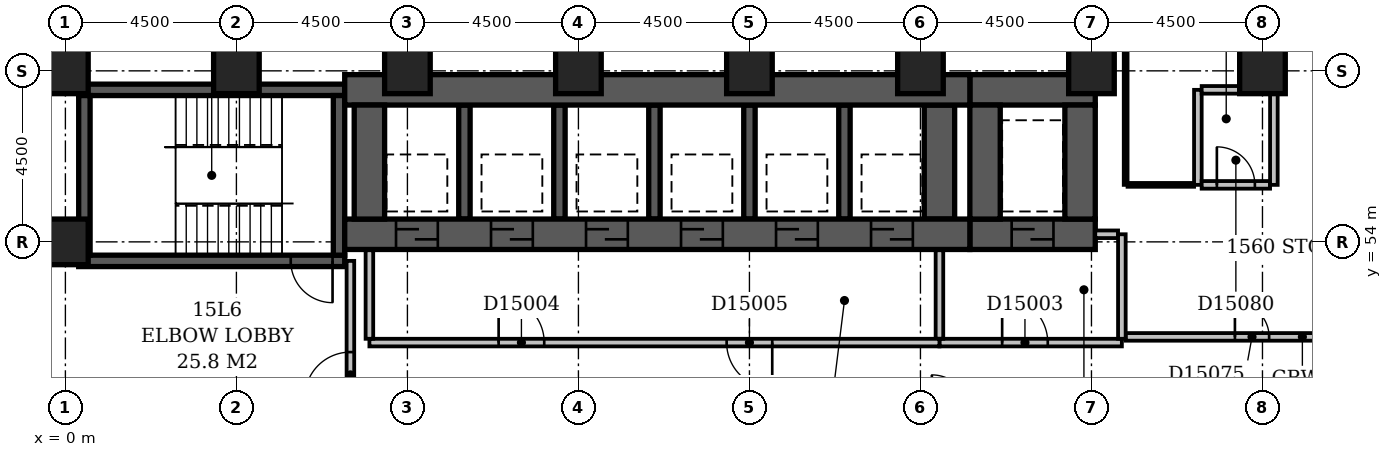
"""IFC4 building model, lengths in metres.
Left out: names, types, materials, properties, quantities, classifications, styles, units other than length and angle.
Written with IfcOpenShell. Run it as: python <this file> out.ifc"""

import sys

from ifc_helpers import new_model, si_unit, direction, frame, frame_2d, origin, origin_2d, place, context, subcontext, project, spatial, rectangle, extrude, element, fill, save


model = new_model("IFC4")
c1 = context("Model", 3, precision=1e-05, world=origin(), true_north=direction((0.0, 1.0)))
c2 = subcontext(c1, "Body", "Model", "MODEL_VIEW")
j1 = project(units=[si_unit("LENGTHUNIT", "METRE"), si_unit("PLANEANGLEUNIT", "RADIAN")], contexts=[c1])
p1 = place(None, origin())
s1 = spatial("IfcSite", under=j1, at=p1, CompositionType="ELEMENT")
p2 = place(p1, origin())
s2 = spatial("IfcBuilding", under=s1, at=p2, CompositionType="ELEMENT")
p3 = place(p2, frame((0.0, 0.0, 65.0)))
s3 = spatial("IfcBuildingStorey", under=s2, at=p3, CompositionType="ELEMENT", Elevation=65.0)
p4 = place(p3, frame((0.35, 53.5, -0.3), z_axis=(0.0, 0.0, 1.0), x_axis=(1.0, 0.0, 0.0)))
e1 = element("IfcWall", 1, at=p4, inside=s3, PredefinedType="SHEAR", context=c2, shape_type="SweptSolid", body=[
    extrude(rectangle(XDim=7.0, YDim=0.3, at=frame_2d((3.5, 0.0))), origin(), (0.0, 0.0, 1.0), 3.6),
])
p5 = place(p4, frame((5.58, 0.0, 0.3)))
e2 = element("IfcOpeningElement", 2, at=p5, cuts=e1, PredefinedType="OPENING", context=c2, shape_type="SweptSolid", body=[
    extrude(rectangle(XDim=1.1, YDim=2.1, at=frame_2d((0.55, 1.05))), frame((0.0, 0.162, 0.0), z_axis=(0.0, -1.0, 0.0), x_axis=(1.0, 0.0, 0.0)), (0.0, 0.0, 1.0), 0.324),
])
p6 = place(p3, frame((0.35, 58.0, -0.3), z_axis=(0.0, 0.0, 1.0), x_axis=(1.0, 0.0, 0.0)))
e3 = element("IfcWall", 3, at=p6, inside=s3, PredefinedType="SHEAR", context=c2, shape_type="SweptSolid", body=[
    extrude(rectangle(XDim=7.0, YDim=0.3, at=frame_2d((3.5, 0.0))), origin(), (0.0, 0.0, 1.0), 3.6),
])
for number, where, z_axis, x_axis in (
    (4, (0.5, 53.65, -0.3), (0.0, 0.0, 1.0), (0.0, 1.0, 0.0)),
    (5, (7.2, 53.65, -0.3), (0.0, 0.0, 1.0), (0.0, 1.0, 0.0)),
):
    element("IfcWall", number, at=place(p3, frame(where, z_axis=z_axis, x_axis=x_axis)), inside=s3, PredefinedType="SHEAR", context=c2, shape_type="SweptSolid", body=[
        extrude(rectangle(XDim=4.2, YDim=0.3, at=frame_2d((2.1, 0.0))), origin(), (0.0, 0.0, 1.0), 3.6),
    ])
p7 = place(p3, frame((7.35, 54.2, -0.3), z_axis=(0.0, 0.0, 1.0), x_axis=(1.0, 0.0, 0.0)))
e6 = element("IfcWall", 6, at=p7, inside=s3, PredefinedType="SHEAR", context=c2, shape_type="SweptSolid", body=[
    extrude(rectangle(XDim=16.45, YDim=0.8, at=frame_2d((8.225, 0.0))), origin(), (0.0, 0.0, 1.0), 3.6),
])
p8 = place(p7, frame((1.35, 0.0, 0.3)))
e7 = element("IfcOpeningElement", 7, at=p8, cuts=e6, PredefinedType="OPENING", context=c2, shape_type="SweptSolid", body=[
    extrude(rectangle(XDim=1.1, YDim=2.1, at=frame_2d((0.55, 1.05))), frame((0.0, 0.412, 0.0), z_axis=(0.0, -1.0, 0.0), x_axis=(1.0, 0.0, 0.0)), (0.0, 0.0, 1.0), 0.824),
])
p9 = place(p7, frame((3.85, 0.0, 0.3)))
e8 = element("IfcOpeningElement", 8, at=p9, cuts=e6, PredefinedType="OPENING", context=c2, shape_type="SweptSolid", body=[
    extrude(rectangle(XDim=1.1, YDim=2.1, at=frame_2d((0.55, 1.05))), frame((0.0, 0.412, 0.0), z_axis=(0.0, -1.0, 0.0), x_axis=(1.0, 0.0, 0.0)), (0.0, 0.0, 1.0), 0.824),
])
p10 = place(p7, frame((6.35, 0.0, 0.3)))
e9 = element("IfcOpeningElement", 9, at=p10, cuts=e6, PredefinedType="OPENING", context=c2, shape_type="SweptSolid", body=[
    extrude(rectangle(XDim=1.1, YDim=2.1, at=frame_2d((0.55, 1.05))), frame((0.0, 0.412, 0.0), z_axis=(0.0, -1.0, 0.0), x_axis=(1.0, 0.0, 0.0)), (0.0, 0.0, 1.0), 0.824),
])
p11 = place(p7, frame((8.85, 0.0, 0.3)))
e10 = element("IfcOpeningElement", 10, at=p11, cuts=e6, PredefinedType="OPENING", context=c2, shape_type="SweptSolid", body=[
    extrude(rectangle(XDim=1.1, YDim=2.1, at=frame_2d((0.55, 1.05))), frame((0.0, 0.412, 0.0), z_axis=(0.0, -1.0, 0.0), x_axis=(1.0, 0.0, 0.0)), (0.0, 0.0, 1.0), 0.824),
])
p12 = place(p7, frame((11.35, 0.0, 0.3)))
e11 = element("IfcOpeningElement", 11, at=p12, cuts=e6, PredefinedType="OPENING", context=c2, shape_type="SweptSolid", body=[
    extrude(rectangle(XDim=1.1, YDim=2.1, at=frame_2d((0.55, 1.05))), frame((0.0, 0.412, 0.0), z_axis=(0.0, -1.0, 0.0), x_axis=(1.0, 0.0, 0.0)), (0.0, 0.0, 1.0), 0.824),
])
p13 = place(p7, frame((13.85, 0.0, 0.3)))
e12 = element("IfcOpeningElement", 12, at=p13, cuts=e6, PredefinedType="OPENING", context=c2, shape_type="SweptSolid", body=[
    extrude(rectangle(XDim=1.1, YDim=2.1, at=frame_2d((0.55, 1.05))), frame((0.0, 0.412, 0.0), z_axis=(0.0, -1.0, 0.0), x_axis=(1.0, 0.0, 0.0)), (0.0, 0.0, 1.0), 0.824),
])
p14 = place(p3, frame((7.35, 58.0, -0.3), z_axis=(0.0, 0.0, 1.0), x_axis=(1.0, 0.0, 0.0)))
e13 = element("IfcWall", 13, at=p14, inside=s3, PredefinedType="SHEAR", context=c2, shape_type="SweptSolid", body=[
    extrude(rectangle(XDim=16.45, YDim=0.8, at=frame_2d((8.225, 0.0))), origin(), (0.0, 0.0, 1.0), 3.6),
])
p15 = place(p3, frame((8.0, 54.6, -0.3), z_axis=(0.0, 0.0, 1.0), x_axis=(0.0, 1.0, 0.0)))
e14 = element("IfcWall", 14, at=p15, inside=s3, PredefinedType="SHEAR", context=c2, shape_type="SweptSolid", body=[
    extrude(rectangle(XDim=3.0, YDim=0.8, at=frame_2d((1.5, 0.0))), origin(), (0.0, 0.0, 1.0), 3.6),
])
for number, where, z_axis, x_axis in (
    (15, (10.5, 54.6, -0.3), (0.0, 0.0, 1.0), (0.0, 1.0, 0.0)),
    (16, (13.0, 54.6, -0.3), (0.0, 0.0, 1.0), (0.0, 1.0, 0.0)),
    (17, (15.5, 54.6, -0.3), (0.0, 0.0, 1.0), (0.0, 1.0, 0.0)),
    (18, (18.0, 54.6, -0.3), (0.0, 0.0, 1.0), (0.0, 1.0, 0.0)),
    (19, (20.5, 54.6, -0.3), (0.0, 0.0, 1.0), (0.0, 1.0, 0.0)),
):
    element("IfcWall", number, at=place(p3, frame(where, z_axis=z_axis, x_axis=x_axis)), inside=s3, PredefinedType="SHEAR", context=c2, shape_type="SweptSolid", body=[
        extrude(rectangle(XDim=3.0, YDim=0.3, at=frame_2d((1.5, 0.0))), origin(), (0.0, 0.0, 1.0), 3.6),
    ])
p16 = place(p3, frame((23.0, 54.6, -0.3), z_axis=(0.0, 0.0, 1.0), x_axis=(0.0, 1.0, 0.0)))
e20 = element("IfcWall", 20, at=p16, inside=s3, PredefinedType="SHEAR", context=c2, shape_type="SweptSolid", body=[
    extrude(rectangle(XDim=3.0, YDim=0.8, at=frame_2d((1.5, 0.0))), origin(), (0.0, 0.0, 1.0), 3.6),
])
p17 = place(p3, frame((23.8, 54.2, -0.3), z_axis=(0.0, 0.0, 1.0), x_axis=(1.0, 0.0, 0.0)))
e21 = element("IfcWall", 21, at=p17, inside=s3, PredefinedType="SHEAR", context=c2, shape_type="SweptSolid", body=[
    extrude(rectangle(XDim=3.3, YDim=0.8, at=frame_2d((1.65, 0.0))), origin(), (0.0, 0.0, 1.0), 3.6),
])
p18 = place(p17, frame((1.1, 0.0, 0.3)))
e22 = element("IfcOpeningElement", 22, at=p18, cuts=e21, PredefinedType="OPENING", context=c2, shape_type="SweptSolid", body=[
    extrude(rectangle(XDim=1.1, YDim=2.1, at=frame_2d((0.55, 1.05))), frame((0.0, 0.412, 0.0), z_axis=(0.0, -1.0, 0.0), x_axis=(1.0, 0.0, 0.0)), (0.0, 0.0, 1.0), 0.824),
])
p19 = place(p3, frame((23.8, 58.0, -0.3), z_axis=(0.0, 0.0, 1.0), x_axis=(1.0, 0.0, 0.0)))
e23 = element("IfcWall", 23, at=p19, inside=s3, PredefinedType="SHEAR", context=c2, shape_type="SweptSolid", body=[
    extrude(rectangle(XDim=3.3, YDim=0.8, at=frame_2d((1.65, 0.0))), origin(), (0.0, 0.0, 1.0), 3.6),
])
for number, where, z_axis, x_axis in (
    (24, (24.2, 54.6, -0.3), (0.0, 0.0, 1.0), (0.0, 1.0, 0.0)),
    (25, (26.7, 54.6, -0.3), (0.0, 0.0, 1.0), (0.0, 1.0, 0.0)),
):
    element("IfcWall", number, at=place(p3, frame(where, z_axis=z_axis, x_axis=x_axis)), inside=s3, PredefinedType="SHEAR", context=c2, shape_type="SweptSolid", body=[
        extrude(rectangle(XDim=3.0, YDim=0.8, at=frame_2d((1.5, 0.0))), origin(), (0.0, 0.0, 1.0), 3.6),
    ])
for number, where, z_axis, x_axis in (
    (26, (0.0, 54.0, -0.3), (0.0, 0.0, 1.0), (1.0, 0.0, 0.0)),
    (27, (0.0, 58.5, -0.3), (0.0, 0.0, 1.0), (1.0, 0.0, 0.0)),
    (28, (4.5, 58.5, -0.3), (0.0, 0.0, 1.0), (1.0, 0.0, 0.0)),
    (29, (9.0, 58.5, -0.3), (0.0, 0.0, 1.0), (1.0, 0.0, 0.0)),
    (30, (13.5, 58.5, -0.3), (0.0, 0.0, 1.0), (1.0, 0.0, 0.0)),
    (31, (18.0, 58.5, -0.3), (0.0, 0.0, 1.0), (1.0, 0.0, 0.0)),
    (32, (22.5, 58.5, -0.3), (0.0, 0.0, 1.0), (1.0, 0.0, 0.0)),
    (33, (27.0, 58.5, -0.3), (0.0, 0.0, 1.0), (1.0, 0.0, 0.0)),
    (34, (31.5, 58.5, -0.3), (0.0, 0.0, 1.0), (1.0, 0.0, 0.0)),
):
    element("IfcColumn", number, at=place(p3, frame(where, z_axis=z_axis, x_axis=x_axis)), inside=s3, PredefinedType="COLUMN", context=c2, shape_type="SweptSolid", body=[
        extrude(rectangle(XDim=1.2, YDim=1.2, at=origin_2d()), origin(), (0.0, 0.0, 1.0), 3.6),
    ])
p20 = place(p3, frame((8.0, 51.35, 0.0), z_axis=(0.0, 0.0, 1.0), x_axis=(1.0, 0.0, 0.0)))
e35 = element("IfcWall", 35, at=p20, inside=s3, PredefinedType="PARTITIONING", context=c2, shape_type="SweptSolid", body=[
    extrude(rectangle(XDim=15.0, YDim=0.2, at=frame_2d((7.5, 0.0))), origin(), (0.0, 0.0, 1.0), 3.3),
])
p21 = place(p20, frame((3.4, 0.0, 0.0)))
e36 = element("IfcOpeningElement", 36, at=p21, cuts=e35, PredefinedType="OPENING", context=c2, shape_type="SweptSolid", body=[
    extrude(rectangle(XDim=1.2, YDim=2.1, at=frame_2d((0.6, 1.05))), frame((0.0, 0.112, 0.0), z_axis=(0.0, -1.0, 0.0), x_axis=(1.0, 0.0, 0.0)), (0.0, 0.0, 1.0), 0.224),
])
p22 = place(p20, frame((9.4, 0.0, 0.0)))
e37 = element("IfcOpeningElement", 37, at=p22, cuts=e35, PredefinedType="OPENING", context=c2, shape_type="SweptSolid", body=[
    extrude(rectangle(XDim=1.2, YDim=2.1, at=frame_2d((0.6, 1.05))), frame((0.0, 0.112, 0.0), z_axis=(0.0, -1.0, 0.0), x_axis=(1.0, 0.0, 0.0)), (0.0, 0.0, 1.0), 0.224),
])
for number, where, z_axis, x_axis in (
    (38, (23.0, 51.45, 0.0), (0.0, 0.0, 1.0), (0.0, 1.0, 0.0)),
    (39, (8.0, 51.45, 0.0), (0.0, 0.0, 1.0), (0.0, 1.0, 0.0)),
):
    element("IfcWall", number, at=place(p3, frame(where, z_axis=z_axis, x_axis=x_axis)), inside=s3, PredefinedType="PARTITIONING", context=c2, shape_type="SweptSolid", body=[
        extrude(rectangle(XDim=2.33, YDim=0.2, at=frame_2d((1.165, 0.0))), origin(), (0.0, 0.0, 1.0), 3.3),
    ])
p23 = place(p3, frame((23.0, 51.35, 0.0), z_axis=(0.0, 0.0, 1.0), x_axis=(1.0, 0.0, 0.0)))
e40 = element("IfcWall", 40, at=p23, inside=s3, PredefinedType="PARTITIONING", context=c2, shape_type="SweptSolid", body=[
    extrude(rectangle(XDim=4.8, YDim=0.2, at=frame_2d((2.4, 0.0))), origin(), (0.0, 0.0, 1.0), 3.3),
])
p24 = place(p23, frame((1.65, 0.0, 0.0)))
e41 = element("IfcOpeningElement", 41, at=p24, cuts=e40, PredefinedType="OPENING", context=c2, shape_type="SweptSolid", body=[
    extrude(rectangle(XDim=1.2, YDim=2.1, at=frame_2d((0.6, 1.05))), frame((0.0, 0.112, 0.0), z_axis=(0.0, -1.0, 0.0), x_axis=(1.0, 0.0, 0.0)), (0.0, 0.0, 1.0), 0.224),
])
p25 = place(p3, frame((27.8, 51.45, 0.0), z_axis=(0.0, 0.0, 1.0), x_axis=(0.0, 1.0, 0.0)))
e42 = element("IfcWall", 42, at=p25, inside=s3, PredefinedType="PARTITIONING", context=c2, shape_type="SweptSolid", body=[
    extrude(rectangle(XDim=2.75, YDim=0.2, at=frame_2d((1.375, 0.0))), origin(), (0.0, 0.0, 1.0), 3.3),
])
p26 = place(p3, frame((27.1, 54.2, 0.0), z_axis=(0.0, 0.0, 1.0), x_axis=(1.0, 0.0, 0.0)))
e43 = element("IfcWall", 43, at=p26, inside=s3, PredefinedType="PARTITIONING", context=c2, shape_type="SweptSolid", body=[
    extrude(rectangle(XDim=0.6, YDim=0.2, at=frame_2d((0.3, 0.0))), origin(), (0.0, 0.0, 1.0), 3.3),
])
p27 = place(p3, frame((7.5, 49.6, 0.0), z_axis=(0.0, 0.0, 1.0), x_axis=(0.0, 1.0, 0.0)))
e44 = element("IfcWall", 44, at=p27, inside=s3, PredefinedType="PARTITIONING", context=c2, shape_type="SweptSolid", body=[
    extrude(rectangle(XDim=3.9, YDim=0.2, at=frame_2d((1.95, 0.0))), origin(), (0.0, 0.0, 1.0), 3.3),
])
p28 = place(p27, frame((0.3, 0.0, 0.0)))
e45 = element("IfcOpeningElement", 45, at=p28, cuts=e44, PredefinedType="OPENING", context=c2, shape_type="SweptSolid", body=[
    extrude(rectangle(XDim=1.2, YDim=2.1, at=frame_2d((0.6, 1.05))), frame((0.0, 0.112, 0.0), z_axis=(0.0, -1.0, 0.0), x_axis=(1.0, 0.0, 0.0)), (0.0, 0.0, 1.0), 0.224),
])
p29 = place(p3, frame((27.9, 51.5, 0.0), z_axis=(0.0, 0.0, 1.0), x_axis=(1.0, 0.0, 0.0)))
e46 = element("IfcWall", 46, at=p29, inside=s3, PredefinedType="PARTITIONING", context=c2, shape_type="SweptSolid", body=[
    extrude(rectangle(XDim=9.3, YDim=0.2, at=frame_2d((4.65, 0.0))), origin(), (0.0, 0.0, 1.0), 3.3),
])
p30 = place(p29, frame((2.875, 0.0, 0.0)))
e47 = element("IfcOpeningElement", 47, at=p30, cuts=e46, PredefinedType="OPENING", context=c2, shape_type="SweptSolid", body=[
    extrude(rectangle(XDim=0.9, YDim=2.1, at=frame_2d((0.45, 1.05))), frame((0.0, 0.112, 0.0), z_axis=(0.0, -1.0, 0.0), x_axis=(1.0, 0.0, 0.0)), (0.0, 0.0, 1.0), 0.224),
])
p31 = place(p29, frame((7.575, 0.0, 0.0)))
e48 = element("IfcOpeningElement", 48, at=p31, cuts=e46, PredefinedType="OPENING", context=c2, shape_type="SweptSolid", body=[
    extrude(rectangle(XDim=1.0, YDim=2.1, at=frame_2d((0.5, 1.05))), frame((0.0, 0.112, 0.0), z_axis=(0.0, -1.0, 0.0), x_axis=(1.0, 0.0, 0.0)), (0.0, 0.0, 1.0), 0.224),
])
p32 = place(p3, frame((27.9, 55.5, 0.0), z_axis=(0.0, 0.0, 1.0), x_axis=(0.0, 1.0, 0.0)))
e49 = element("IfcWall", 49, at=p32, inside=s3, PredefinedType="PARTITIONING", context=c2, shape_type="SweptSolid", body=[
    extrude(rectangle(XDim=3.6, YDim=0.1, at=frame_2d((1.8, 0.0))), origin(), (0.0, 0.0, 1.0), 3.3),
])
p33 = place(p3, frame((27.95, 55.5, 0.0), z_axis=(0.0, 0.0, 1.0), x_axis=(1.0, 0.0, 0.0)))
e50 = element("IfcWall", 50, at=p33, inside=s3, PredefinedType="PARTITIONING", context=c2, shape_type="SweptSolid", body=[
    extrude(rectangle(XDim=1.75, YDim=0.1, at=frame_2d((0.875, 0.0))), origin(), (0.0, 0.0, 1.0), 3.3),
])
p34 = place(p3, frame((29.8, 55.5, 0.0), z_axis=(0.0, 0.0, 1.0), x_axis=(0.0, 1.0, 0.0)))
e51 = element("IfcWall", 51, at=p34, inside=s3, PredefinedType="PARTITIONING", context=c2, shape_type="SweptSolid", body=[
    extrude(rectangle(XDim=2.5, YDim=0.2, at=frame_2d((1.25, 0.0))), origin(), (0.0, 0.0, 1.0), 3.3),
])
p35 = place(p3, frame((29.9, 55.5, 0.0), z_axis=(0.0, 0.0, 1.0), x_axis=(1.0, 0.0, 0.0)))
e52 = element("IfcWall", 52, at=p35, inside=s3, PredefinedType="PARTITIONING", context=c2, shape_type="SweptSolid", body=[
    extrude(rectangle(XDim=1.8, YDim=0.2, at=frame_2d((0.9, 0.0))), origin(), (0.0, 0.0, 1.0), 3.3),
])
p36 = place(p35, frame((0.4, 0.0, 0.0)))
e53 = element("IfcOpeningElement", 53, at=p36, cuts=e52, PredefinedType="OPENING", context=c2, shape_type="SweptSolid", body=[
    extrude(rectangle(XDim=1.0, YDim=2.1, at=frame_2d((0.5, 1.05))), frame((0.0, 0.112, 0.0), z_axis=(0.0, -1.0, 0.0), x_axis=(1.0, 0.0, 0.0)), (0.0, 0.0, 1.0), 0.224),
])
p37 = place(p3, frame((31.8, 55.5, 0.0), z_axis=(0.0, 0.0, 1.0), x_axis=(0.0, 1.0, 0.0)))
e54 = element("IfcWall", 54, at=p37, inside=s3, PredefinedType="PARTITIONING", context=c2, shape_type="SweptSolid", body=[
    extrude(rectangle(XDim=2.5, YDim=0.2, at=frame_2d((1.25, 0.0))), origin(), (0.0, 0.0, 1.0), 3.3),
])
p38 = place(p3, frame((29.9, 58.0, 0.0), z_axis=(0.0, 0.0, 1.0), x_axis=(1.0, 0.0, 0.0)))
e55 = element("IfcWall", 55, at=p38, inside=s3, PredefinedType="PARTITIONING", context=c2, shape_type="SweptSolid", body=[
    extrude(rectangle(XDim=1.8, YDim=0.2, at=frame_2d((0.9, 0.0))), origin(), (0.0, 0.0, 1.0), 3.3),
])
p39 = place(p28, origin())
e56 = element("IfcDoor", 56, at=p39, inside=s3, OperationType="SINGLE_SWING_LEFT", PredefinedType="DOOR", context=c2, shape_type="SweptSolid", body=[
    extrude(rectangle(XDim=1.2, YDim=2.1, at=frame_2d((0.6, 1.05))), frame((0.0, 0.025, 0.0), z_axis=(0.0, -1.0, 0.0), x_axis=(1.0, 0.0, 0.0)), (0.0, 0.0, 1.0), 0.05),
])
fill(e45, e56)
p40 = place(p24, origin())
e57 = element("IfcDoor", 57, at=p40, inside=s3, OperationType="SINGLE_SWING_LEFT", PredefinedType="DOOR", context=c2, shape_type="SweptSolid", body=[
    extrude(rectangle(XDim=1.2, YDim=2.1, at=frame_2d((0.6, 1.05))), frame((0.0, 0.025, 0.0), z_axis=(0.0, -1.0, 0.0), x_axis=(1.0, 0.0, 0.0)), (0.0, 0.0, 1.0), 0.05),
])
fill(e41, e57)
p41 = place(p18, origin())
e58 = element("IfcDoor", 58, at=p41, inside=s3, OperationType="SLIDING_TO_LEFT", PredefinedType="DOOR", context=c2, shape_type="SweptSolid", body=[
    extrude(rectangle(XDim=1.1, YDim=2.1, at=frame_2d((0.55, 1.05))), frame((0.0, 0.025, 0.0), z_axis=(0.0, -1.0, 0.0), x_axis=(1.0, 0.0, 0.0)), (0.0, 0.0, 1.0), 0.05),
])
fill(e22, e58)
p42 = place(p8, origin())
e59 = element("IfcDoor", 59, at=p42, inside=s3, OperationType="SLIDING_TO_LEFT", PredefinedType="DOOR", context=c2, shape_type="SweptSolid", body=[
    extrude(rectangle(XDim=1.1, YDim=2.1, at=frame_2d((0.55, 1.05))), frame((0.0, 0.025, 0.0), z_axis=(0.0, -1.0, 0.0), x_axis=(1.0, 0.0, 0.0)), (0.0, 0.0, 1.0), 0.05),
])
fill(e7, e59)
p43 = place(p9, origin())
e60 = element("IfcDoor", 60, at=p43, inside=s3, OperationType="SLIDING_TO_LEFT", PredefinedType="DOOR", context=c2, shape_type="SweptSolid", body=[
    extrude(rectangle(XDim=1.1, YDim=2.1, at=frame_2d((0.55, 1.05))), frame((0.0, 0.025, 0.0), z_axis=(0.0, -1.0, 0.0), x_axis=(1.0, 0.0, 0.0)), (0.0, 0.0, 1.0), 0.05),
])
fill(e8, e60)
p44 = place(p10, origin())
e61 = element("IfcDoor", 61, at=p44, inside=s3, OperationType="SLIDING_TO_LEFT", PredefinedType="DOOR", context=c2, shape_type="SweptSolid", body=[
    extrude(rectangle(XDim=1.1, YDim=2.1, at=frame_2d((0.55, 1.05))), frame((0.0, 0.025, 0.0), z_axis=(0.0, -1.0, 0.0), x_axis=(1.0, 0.0, 0.0)), (0.0, 0.0, 1.0), 0.05),
])
fill(e9, e61)
p45 = place(p11, origin())
e62 = element("IfcDoor", 62, at=p45, inside=s3, OperationType="SLIDING_TO_LEFT", PredefinedType="DOOR", context=c2, shape_type="SweptSolid", body=[
    extrude(rectangle(XDim=1.1, YDim=2.1, at=frame_2d((0.55, 1.05))), frame((0.0, 0.025, 0.0), z_axis=(0.0, -1.0, 0.0), x_axis=(1.0, 0.0, 0.0)), (0.0, 0.0, 1.0), 0.05),
])
fill(e10, e62)
p46 = place(p12, origin())
e63 = element("IfcDoor", 63, at=p46, inside=s3, OperationType="SLIDING_TO_LEFT", PredefinedType="DOOR", context=c2, shape_type="SweptSolid", body=[
    extrude(rectangle(XDim=1.1, YDim=2.1, at=frame_2d((0.55, 1.05))), frame((0.0, 0.025, 0.0), z_axis=(0.0, -1.0, 0.0), x_axis=(1.0, 0.0, 0.0)), (0.0, 0.0, 1.0), 0.05),
])
fill(e11, e63)
p47 = place(p13, origin())
e64 = element("IfcDoor", 64, at=p47, inside=s3, OperationType="SLIDING_TO_LEFT", PredefinedType="DOOR", context=c2, shape_type="SweptSolid", body=[
    extrude(rectangle(XDim=1.1, YDim=2.1, at=frame_2d((0.55, 1.05))), frame((0.0, 0.025, 0.0), z_axis=(0.0, -1.0, 0.0), x_axis=(1.0, 0.0, 0.0)), (0.0, 0.0, 1.0), 0.05),
])
fill(e12, e64)
p48 = place(p21, origin())
e65 = element("IfcDoor", 65, at=p48, inside=s3, OperationType="SINGLE_SWING_LEFT", PredefinedType="DOOR", context=c2, shape_type="SweptSolid", body=[
    extrude(rectangle(XDim=1.2, YDim=2.1, at=frame_2d((0.6, 1.05))), frame((0.0, 0.025, 0.0), z_axis=(0.0, -1.0, 0.0), x_axis=(1.0, 0.0, 0.0)), (0.0, 0.0, 1.0), 0.05),
])
fill(e36, e65)
p49 = place(p22, origin())
e66 = element("IfcDoor", 66, at=p49, inside=s3, OperationType="SINGLE_SWING_RIGHT", PredefinedType="DOOR", context=c2, shape_type="SweptSolid", body=[
    extrude(rectangle(XDim=1.2, YDim=2.1, at=frame_2d((0.6, 1.05))), frame((0.0, 0.025, 0.0), z_axis=(0.0, -1.0, 0.0), x_axis=(1.0, 0.0, 0.0)), (0.0, 0.0, 1.0), 0.05),
])
fill(e37, e66)
p50 = place(p5, origin())
e67 = element("IfcDoor", 67, at=p50, inside=s3, OperationType="SINGLE_SWING_RIGHT", PredefinedType="DOOR", context=c2, shape_type="SweptSolid", body=[
    extrude(rectangle(XDim=1.1, YDim=2.1, at=frame_2d((0.55, 1.05))), frame((0.0, 0.025, 0.0), z_axis=(0.0, -1.0, 0.0), x_axis=(1.0, 0.0, 0.0)), (0.0, 0.0, 1.0), 0.05),
])
fill(e2, e67)
p51 = place(p30, origin())
e68 = element("IfcDoor", 68, at=p51, inside=s3, OperationType="SINGLE_SWING_LEFT", PredefinedType="DOOR", context=c2, shape_type="SweptSolid", body=[
    extrude(rectangle(XDim=0.9, YDim=2.1, at=frame_2d((0.45, 1.05))), frame((0.0, 0.025, 0.0), z_axis=(0.0, -1.0, 0.0), x_axis=(1.0, 0.0, 0.0)), (0.0, 0.0, 1.0), 0.05),
])
fill(e47, e68)
p52 = place(p36, origin())
e69 = element("IfcDoor", 69, at=p52, inside=s3, OperationType="SINGLE_SWING_LEFT", PredefinedType="DOOR", context=c2, shape_type="SweptSolid", body=[
    extrude(rectangle(XDim=1.0, YDim=2.1, at=frame_2d((0.5, 1.05))), frame((0.0, 0.025, 0.0), z_axis=(0.0, -1.0, 0.0), x_axis=(1.0, 0.0, 0.0)), (0.0, 0.0, 1.0), 0.05),
])
fill(e53, e69)
save(model, sys.argv[1])
